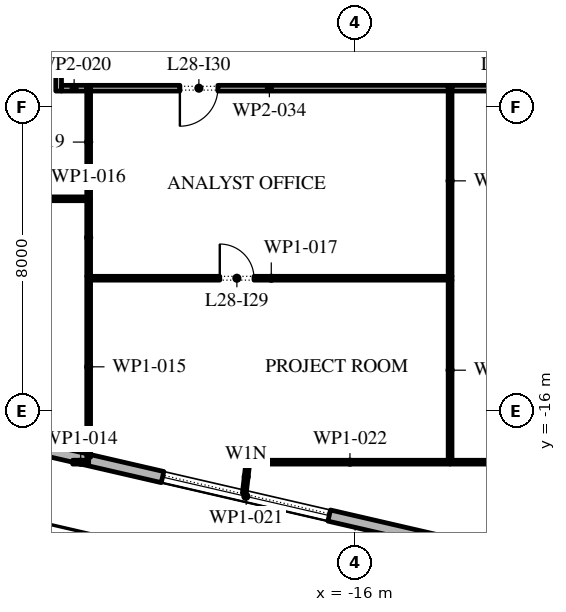
"""IFC4 building model, lengths in metres.
Left out: names, types, materials, properties, quantities, classifications, styles, units other than length and angle.
Written with IfcOpenShell. Run it as: python <this file> out.ifc"""

import sys

from ifc_helpers import new_model, si_unit, direction, frame, frame_2d, origin, place, context, subcontext, project, spatial, rectangle, extrude, element, fill, save


model = new_model("IFC4")
c1 = context("Model", 3, precision=1e-05, world=origin(), true_north=direction((0.0, 1.0)))
c2 = subcontext(c1, "Body", "Model", "MODEL_VIEW")
j1 = project(units=[si_unit("LENGTHUNIT", "METRE"), si_unit("PLANEANGLEUNIT", "RADIAN")], contexts=[c1])
p1 = place(None, origin())
s1 = spatial("IfcSite", under=j1, at=p1, CompositionType="ELEMENT")
p2 = place(p1, origin())
s2 = spatial("IfcBuilding", under=s1, at=p2, CompositionType="ELEMENT")
p3 = place(p2, frame((0.0, 0.0, 130.8)))
s3 = spatial("IfcBuildingStorey", under=s2, at=p3, CompositionType="ELEMENT", Elevation=130.8)
p4 = place(p3, frame((-31.078, -15.421, 0.0), z_axis=(0.0, 0.0, 1.0), x_axis=(0.974370456532, -0.224949357493, 0.0)))
e1 = element("IfcWall", 1, at=p4, inside=s3, PredefinedType="STANDARD", context=c2, shape_type="SweptSolid", body=[
    extrude(rectangle(XDim=51.0, YDim=0.3, at=frame_2d((25.5, 0.0))), origin(), (0.0, 0.0, 1.0), 4.0),
])
p5 = place(p4, frame((1.875, 0.0, 0.45)))
e2 = element("IfcOpeningElement", 2, at=p5, cuts=e1, PredefinedType="OPENING", context=c2, shape_type="SweptSolid", body=[
    extrude(rectangle(XDim=4.5, YDim=2.65, at=frame_2d((2.25, 1.325))), frame((0.0, 0.16, 0.0), z_axis=(0.0, -1.0, 0.0), x_axis=(1.0, 0.0, 0.0)), (0.0, 0.0, 1.0), 0.32),
])
p6 = place(p4, frame((10.275, 0.0, 0.45)))
e3 = element("IfcOpeningElement", 3, at=p6, cuts=e1, PredefinedType="OPENING", context=c2, shape_type="SweptSolid", body=[
    extrude(rectangle(XDim=4.5, YDim=2.525, at=frame_2d((2.25, 1.262))), frame((0.0, 0.16, 0.0), z_axis=(0.0, -1.0, 0.0), x_axis=(1.0, 0.0, 0.0)), (0.0, 0.0, 1.0), 0.32),
])
p7 = place(p4, frame((18.825, 0.0, 0.45)))
e4 = element("IfcOpeningElement", 4, at=p7, cuts=e1, PredefinedType="OPENING", context=c2, shape_type="SweptSolid", body=[
    extrude(rectangle(XDim=4.5, YDim=2.5, at=frame_2d((2.25, 1.25))), frame((0.0, 0.16, 0.0), z_axis=(0.0, -1.0, 0.0), x_axis=(1.0, 0.0, 0.0)), (0.0, 0.0, 1.0), 0.32),
])
p8 = place(p4, frame((28.425, 0.0, 0.0)))
e5 = element("IfcOpeningElement", 5, at=p8, cuts=e1, PredefinedType="OPENING", context=c2, shape_type="SweptSolid", body=[
    extrude(rectangle(XDim=2.4, YDim=2.9, at=frame_2d((1.2, 1.45))), frame((0.0, 0.16, 0.0), z_axis=(0.0, -1.0, 0.0), x_axis=(1.0, 0.0, 0.0)), (0.0, 0.0, 1.0), 0.32),
])
p9 = place(p4, frame((35.925, 0.0, 0.45)))
e6 = element("IfcOpeningElement", 6, at=p9, cuts=e1, PredefinedType="OPENING", context=c2, shape_type="SweptSolid", body=[
    extrude(rectangle(XDim=4.5, YDim=2.45, at=frame_2d((2.25, 1.225))), frame((0.0, 0.16, 0.0), z_axis=(0.0, -1.0, 0.0), x_axis=(1.0, 0.0, 0.0)), (0.0, 0.0, 1.0), 0.32),
])
p10 = place(p4, frame((44.475, 0.0, 0.45)))
e7 = element("IfcOpeningElement", 7, at=p10, cuts=e1, PredefinedType="OPENING", context=c2, shape_type="SweptSolid", body=[
    extrude(rectangle(XDim=4.5, YDim=2.45, at=frame_2d((2.25, 1.225))), frame((0.0, 0.16, 0.0), z_axis=(0.0, -1.0, 0.0), x_axis=(1.0, 0.0, 0.0)), (0.0, 0.0, 1.0), 0.32),
])
p11 = place(p3, frame((-22.82, 37.016, 0.0), z_axis=(0.0, 0.0, 1.0), x_axis=(-0.224953880882, -0.974369412223, 0.0)))
e8 = element("IfcWall", 8, at=p11, inside=s3, PredefinedType="STANDARD", context=c2, shape_type="SweptSolid", body=[
    extrude(rectangle(XDim=49.5, YDim=0.3, at=frame_2d((24.75, 0.0))), origin(), (0.0, 0.0, 1.0), 4.0),
])
p12 = place(p11, frame((1.157, 0.0, 0.45)))
e9 = element("IfcOpeningElement", 9, at=p12, cuts=e8, PredefinedType="OPENING", context=c2, shape_type="SweptSolid", body=[
    extrude(rectangle(XDim=4.5, YDim=3.05, at=frame_2d((2.25, 1.525))), frame((0.0, 0.16, 0.0), z_axis=(0.0, -1.0, 0.0), x_axis=(1.0, 0.0, 0.0)), (0.0, 0.0, 1.0), 0.32),
])
p13 = place(p11, frame((8.121, 0.0, 0.45)))
e10 = element("IfcOpeningElement", 10, at=p13, cuts=e8, PredefinedType="OPENING", context=c2, shape_type="SweptSolid", body=[
    extrude(rectangle(XDim=4.5, YDim=3.05, at=frame_2d((2.25, 1.525))), frame((0.0, 0.16, 0.0), z_axis=(0.0, -1.0, 0.0), x_axis=(1.0, 0.0, 0.0)), (0.0, 0.0, 1.0), 0.32),
])
p14 = place(p11, frame((15.236, 0.0, 0.45)))
e11 = element("IfcOpeningElement", 11, at=p14, cuts=e8, PredefinedType="OPENING", context=c2, shape_type="SweptSolid", body=[
    extrude(rectangle(XDim=4.5, YDim=3.05, at=frame_2d((2.25, 1.525))), frame((0.0, 0.16, 0.0), z_axis=(0.0, -1.0, 0.0), x_axis=(1.0, 0.0, 0.0)), (0.0, 0.0, 1.0), 0.32),
])
p15 = place(p11, frame((23.4, 0.0, 0.0)))
e12 = element("IfcOpeningElement", 12, at=p15, cuts=e8, PredefinedType="OPENING", context=c2, shape_type="SweptSolid", body=[
    extrude(rectangle(XDim=2.4, YDim=3.5, at=frame_2d((1.2, 1.75))), frame((0.0, 0.16, 0.0), z_axis=(0.0, -1.0, 0.0), x_axis=(1.0, 0.0, 0.0)), (0.0, 0.0, 1.0), 0.32),
])
p16 = place(p11, frame((29.464, 0.0, 0.45)))
e13 = element("IfcOpeningElement", 13, at=p16, cuts=e8, PredefinedType="OPENING", context=c2, shape_type="SweptSolid", body=[
    extrude(rectangle(XDim=4.5, YDim=2.875, at=frame_2d((2.25, 1.438))), frame((0.0, 0.16, 0.0), z_axis=(0.0, -1.0, 0.0), x_axis=(1.0, 0.0, 0.0)), (0.0, 0.0, 1.0), 0.32),
])
p17 = place(p11, frame((36.579, 0.0, 0.45)))
e14 = element("IfcOpeningElement", 14, at=p17, cuts=e8, PredefinedType="OPENING", context=c2, shape_type="SweptSolid", body=[
    extrude(rectangle(XDim=4.5, YDim=2.675, at=frame_2d((2.25, 1.337))), frame((0.0, 0.16, 0.0), z_axis=(0.0, -1.0, 0.0), x_axis=(1.0, 0.0, 0.0)), (0.0, 0.0, 1.0), 0.32),
])
p18 = place(p11, frame((43.693, 0.0, 0.45)))
e15 = element("IfcOpeningElement", 15, at=p18, cuts=e8, PredefinedType="OPENING", context=c2, shape_type="SweptSolid", body=[
    extrude(rectangle(XDim=4.5, YDim=3.05, at=frame_2d((2.25, 1.525))), frame((0.0, 0.16, 0.0), z_axis=(0.0, -1.0, 0.0), x_axis=(1.0, 0.0, 0.0)), (0.0, 0.0, 1.0), 0.32),
])
p19 = place(p3, frame((-23.8, -7.575, 0.0), z_axis=(0.0, 0.0, 1.0), x_axis=(0.0, 1.0, 0.0)))
e16 = element("IfcWall", 16, at=p19, inside=s3, PredefinedType="PARTITIONING", context=c2, shape_type="SweptSolid", body=[
    extrude(rectangle(XDim=3.255, YDim=0.15, at=frame_2d((1.627, 0.0))), origin(), (0.0, 0.0, 1.0), 4.0),
])
p20 = place(p19, frame((1.105, 0.0, 0.0)))
e17 = element("IfcOpeningElement", 17, at=p20, cuts=e16, PredefinedType="OPENING", context=c2, shape_type="SweptSolid", body=[
    extrude(rectangle(XDim=1.0, YDim=2.1, at=frame_2d((0.5, 1.05))), frame((0.0, 0.085, 0.0), z_axis=(0.0, -1.0, 0.0), x_axis=(1.0, 0.0, 0.0)), (0.0, 0.0, 1.0), 0.17),
])
p21 = place(p3, frame((-23.43, -17.34, 0.0), z_axis=(0.0, 0.0, 1.0), x_axis=(1.0, 0.0, 0.0)))
e18 = element("IfcWall", 18, at=p21, inside=s3, PredefinedType="PARTITIONING", context=c2, shape_type="SweptSolid", body=[
    extrude(rectangle(XDim=0.42, YDim=0.1, at=frame_2d((0.21, 0.0))), origin(), (0.0, 0.0, 1.0), 4.0),
])
p22 = place(p3, frame((-23.01, -17.212, 0.0), z_axis=(0.0, 0.0, 1.0), x_axis=(0.0, 1.0, 0.0)))
e19 = element("IfcWall", 19, at=p22, inside=s3, PredefinedType="PARTITIONING", context=c2, shape_type="SweptSolid", body=[
    extrude(rectangle(XDim=4.762, YDim=0.1, at=frame_2d((2.381, 0.0))), origin(), (0.0, 0.0, 1.0), 4.0),
])
p23 = place(p3, frame((-23.01, -12.45, 0.0), z_axis=(0.0, 0.0, 1.0), x_axis=(0.0, 1.0, 0.0)))
e20 = element("IfcWall", 20, at=p23, inside=s3, PredefinedType="PARTITIONING", context=c2, shape_type="SweptSolid", body=[
    extrude(rectangle(XDim=2.04, YDim=0.1, at=frame_2d((1.02, 0.0))), origin(), (0.0, 0.0, 1.0), 4.0),
])
p24 = place(p3, frame((-22.96, -12.5, 0.0), z_axis=(0.0, 0.0, 1.0), x_axis=(1.0, 0.0, 0.0)))
e21 = element("IfcWall", 21, at=p24, inside=s3, PredefinedType="PARTITIONING", context=c2, shape_type="SweptSolid", body=[
    extrude(rectangle(XDim=9.51, YDim=0.1, at=frame_2d((4.755, 0.0))), origin(), (0.0, 0.0, 1.0), 4.0),
])
p25 = place(p24, frame((3.4, 0.0, 0.0)))
e22 = element("IfcOpeningElement", 22, at=p25, cuts=e21, PredefinedType="OPENING", context=c2, shape_type="SweptSolid", body=[
    extrude(rectangle(XDim=0.9, YDim=2.1, at=frame_2d((0.45, 1.05))), frame((0.0, 0.06, 0.0), z_axis=(0.0, -1.0, 0.0), x_axis=(1.0, 0.0, 0.0)), (0.0, 0.0, 1.0), 0.12),
])
p26 = place(p3, frame((-23.06, -10.41, 0.0), z_axis=(0.0, 0.0, 1.0), x_axis=(-1.0, 0.0, 0.0)))
e23 = element("IfcWall", 23, at=p26, inside=s3, PredefinedType="PARTITIONING", context=c2, shape_type="SweptSolid", body=[
    extrude(rectangle(XDim=8.97, YDim=0.1, at=frame_2d((4.485, 0.0))), origin(), (0.0, 0.0, 1.0), 4.0),
])
p27 = place(p26, frame((3.92, 0.0, 0.0)))
e24 = element("IfcOpeningElement", 24, at=p27, cuts=e23, PredefinedType="OPENING", context=c2, shape_type="SweptSolid", body=[
    extrude(rectangle(XDim=0.9, YDim=2.1, at=frame_2d((0.45, 1.05))), frame((0.0, 0.06, 0.0), z_axis=(0.0, -1.0, 0.0), x_axis=(1.0, 0.0, 0.0)), (0.0, 0.0, 1.0), 0.12),
])
p28 = place(p3, frame((-23.01, -10.41, 0.0), z_axis=(0.0, 0.0, 1.0), x_axis=(0.0, 1.0, 0.0)))
e25 = element("IfcWall", 25, at=p28, inside=s3, PredefinedType="PARTITIONING", context=c2, shape_type="SweptSolid", body=[
    extrude(rectangle(XDim=2.985, YDim=0.1, at=frame_2d((1.492, 0.0))), origin(), (0.0, 0.0, 1.0), 4.0),
])
p29 = place(p3, frame((-23.06, -7.5, 0.0), z_axis=(0.0, 0.0, 1.0), x_axis=(-1.0, 0.0, 0.0)))
e26 = element("IfcWall", 26, at=p29, inside=s3, PredefinedType="PARTITIONING", context=c2, shape_type="SweptSolid", body=[
    extrude(rectangle(XDim=0.665, YDim=0.15, at=frame_2d((0.333, 0.0))), origin(), (0.0, 0.0, 1.0), 4.0),
])
p30 = place(p3, frame((-18.915, -18.157, 0.0), z_axis=(0.0, 0.0, 1.0), x_axis=(0.11580251051, 0.993272258024, 0.0)))
e27 = element("IfcWall", 27, at=p30, inside=s3, PredefinedType="PARTITIONING", context=c2, shape_type="SweptSolid", body=[
    extrude(rectangle(XDim=0.873, YDim=0.1, at=frame_2d((0.437, 0.0))), origin(), (0.0, 0.0, 1.0), 4.0),
])
p31 = place(p3, frame((-18.77, -17.34, 0.0), z_axis=(0.0, 0.0, 1.0), x_axis=(1.0, 0.0, 0.0)))
e28 = element("IfcWall", 28, at=p31, inside=s3, PredefinedType="PARTITIONING", context=c2, shape_type="SweptSolid", body=[
    extrude(rectangle(XDim=5.27, YDim=0.1, at=frame_2d((2.635, 0.0))), origin(), (0.0, 0.0, 1.0), 4.0),
])
p32 = place(p3, frame((-13.5, -17.29, 0.0), z_axis=(0.0, 0.0, 1.0), x_axis=(0.0, 1.0, 0.0)))
e29 = element("IfcWall", 29, at=p32, inside=s3, PredefinedType="PARTITIONING", context=c2, shape_type="SweptSolid", body=[
    extrude(rectangle(XDim=4.74, YDim=0.1, at=frame_2d((2.37, 0.0))), origin(), (0.0, 0.0, 1.0), 4.0),
])
p33 = place(p3, frame((-13.5, -17.34, 0.0), z_axis=(0.0, 0.0, 1.0), x_axis=(1.0, 0.0, 0.0)))
e30 = element("IfcWall", 30, at=p33, inside=s3, PredefinedType="PARTITIONING", context=c2, shape_type="SweptSolid", body=[
    extrude(rectangle(XDim=7.21, YDim=0.1, at=frame_2d((3.605, 0.0))), origin(), (0.0, 0.0, 1.0), 4.0),
])
p34 = place(p33, frame((1.7, 0.0, 0.0)))
e31 = element("IfcOpeningElement", 31, at=p34, cuts=e30, PredefinedType="OPENING", context=c2, shape_type="SweptSolid", body=[
    extrude(rectangle(XDim=0.9, YDim=2.1, at=frame_2d((0.45, 1.05))), frame((0.0, 0.06, 0.0), z_axis=(0.0, -1.0, 0.0), x_axis=(1.0, 0.0, 0.0)), (0.0, 0.0, 1.0), 0.12),
])
p35 = place(p3, frame((-13.5, -12.45, 0.0), z_axis=(0.0, 0.0, 1.0), x_axis=(0.0, 1.0, 0.0)))
e32 = element("IfcWall", 32, at=p35, inside=s3, PredefinedType="PARTITIONING", context=c2, shape_type="SweptSolid", body=[
    extrude(rectangle(XDim=5.025, YDim=0.1, at=frame_2d((2.512, 0.0))), origin(), (0.0, 0.0, 1.0), 4.0),
])
p36 = place(p3, frame((-13.55, -7.5, 0.0), z_axis=(0.0, 0.0, 1.0), x_axis=(-1.0, 0.0, 0.0)))
e33 = element("IfcWall", 33, at=p36, inside=s3, PredefinedType="PARTITIONING", context=c2, shape_type="SweptSolid", body=[
    extrude(rectangle(XDim=9.41, YDim=0.15, at=frame_2d((4.705, 0.0))), origin(), (0.0, 0.0, 1.0), 4.0),
])
p37 = place(p36, frame((6.06, 0.0, 0.0)))
e34 = element("IfcOpeningElement", 34, at=p37, cuts=e33, PredefinedType="OPENING", context=c2, shape_type="SweptSolid", body=[
    extrude(rectangle(XDim=1.0, YDim=2.1, at=frame_2d((0.5, 1.05))), frame((0.0, 0.085, 0.0), z_axis=(0.0, -1.0, 0.0), x_axis=(1.0, 0.0, 0.0)), (0.0, 0.0, 1.0), 0.17),
])
p38 = place(p3, frame((-8.2, -7.5, 0.0), z_axis=(0.0, 0.0, 1.0), x_axis=(-1.0, 0.0, 0.0)))
e35 = element("IfcWall", 35, at=p38, inside=s3, PredefinedType="PARTITIONING", context=c2, shape_type="SweptSolid", body=[
    extrude(rectangle(XDim=5.25, YDim=0.15, at=frame_2d((2.625, 0.0))), origin(), (0.0, 0.0, 1.0), 4.0),
])
p39 = place(p38, frame((3.15, 0.0, 0.0)))
e36 = element("IfcOpeningElement", 36, at=p39, cuts=e35, PredefinedType="OPENING", context=c2, shape_type="SweptSolid", body=[
    extrude(rectangle(XDim=1.0, YDim=2.1, at=frame_2d((0.5, 1.05))), frame((0.0, 0.085, 0.0), z_axis=(0.0, -1.0, 0.0), x_axis=(1.0, 0.0, 0.0)), (0.0, 0.0, 1.0), 0.17),
])
p40 = place(p6, origin())
e37 = element("IfcWindow", 37, at=p40, inside=s3, PartitioningType="DOUBLE_PANEL_VERTICAL", PredefinedType="WINDOW", context=c2, shape_type="SweptSolid", body=[
    extrude(rectangle(XDim=4.5, YDim=2.525, at=frame_2d((2.25, 1.262))), frame((0.0, 0.03, 0.0), z_axis=(0.0, -1.0, 0.0), x_axis=(1.0, 0.0, 0.0)), (0.0, 0.0, 1.0), 0.06),
])
fill(e3, e37)
p41 = place(p25, origin())
e38 = element("IfcDoor", 38, at=p41, inside=s3, OperationType="SINGLE_SWING_RIGHT", PredefinedType="DOOR", context=c2, shape_type="SweptSolid", body=[
    extrude(rectangle(XDim=0.9, YDim=2.1, at=frame_2d((0.45, 1.05))), frame((0.0, 0.025, 0.0), z_axis=(0.0, -1.0, 0.0), x_axis=(1.0, 0.0, 0.0)), (0.0, 0.0, 1.0), 0.05),
])
fill(e22, e38)
p42 = place(p37, origin())
e39 = element("IfcDoor", 39, at=p42, inside=s3, OperationType="SINGLE_SWING_LEFT", PredefinedType="DOOR", context=c2, shape_type="SweptSolid", body=[
    extrude(rectangle(XDim=1.0, YDim=2.1, at=frame_2d((0.5, 1.05))), frame((0.0, 0.025, 0.0), z_axis=(0.0, -1.0, 0.0), x_axis=(1.0, 0.0, 0.0)), (0.0, 0.0, 1.0), 0.05),
])
fill(e34, e39)
save(model, sys.argv[1])
